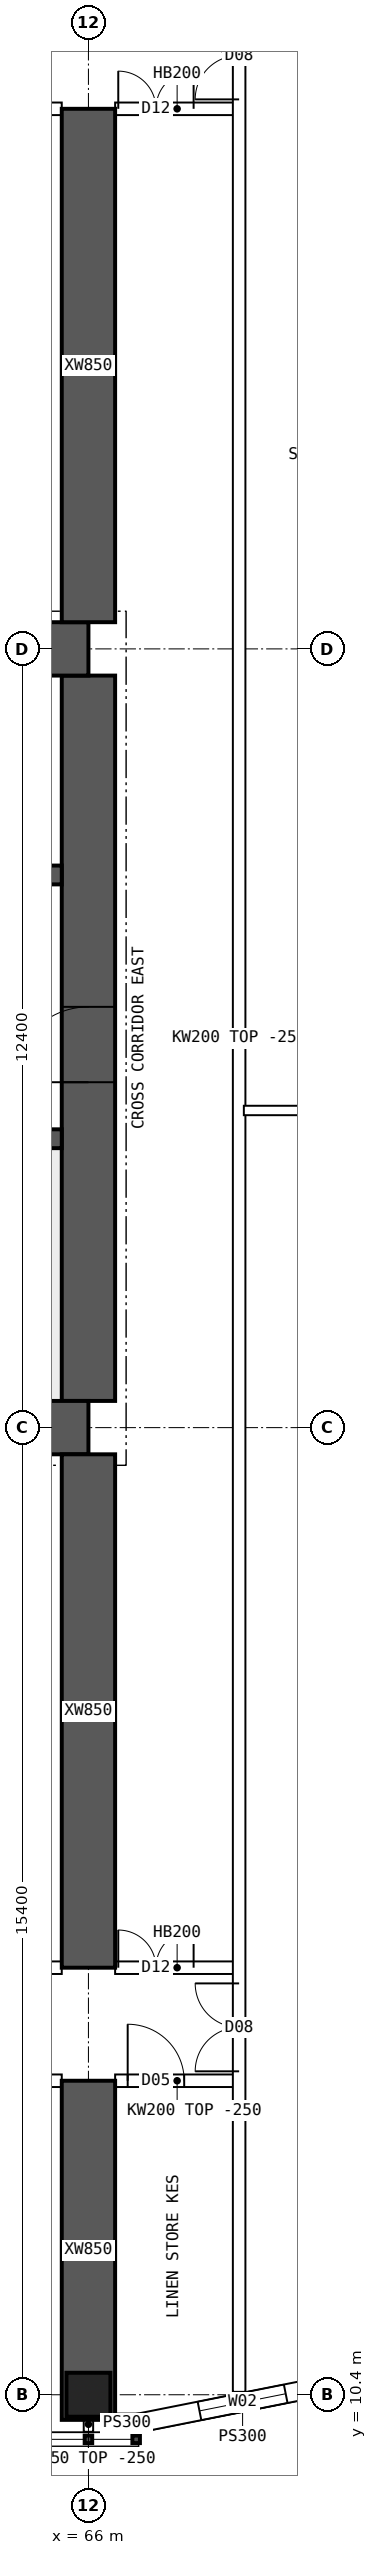
"""IFC4 building model, lengths in metres.
Left out: names, types, materials, properties, quantities, classifications, styles, units other than length and angle.
Written with IfcOpenShell. Run it as: python <this file> out.ifc"""

import sys

from ifc_helpers import new_model, si_unit, direction, frame, frame_2d, origin, origin_2d, place, context, subcontext, project, spatial, polyline, rectangle, hollow_rectangle, outline, extrude, element, fill, save


model = new_model("IFC4")
c1 = context("Model", 3, precision=1e-05, world=origin(), true_north=direction((0.0, 1.0)))
c2 = subcontext(c1, "Body", "Model", "MODEL_VIEW")
j1 = project(units=[si_unit("LENGTHUNIT", "METRE"), si_unit("PLANEANGLEUNIT", "RADIAN")], contexts=[c1])
p1 = place(None, origin())
s1 = spatial("IfcSite", under=j1, at=p1, CompositionType="ELEMENT")
p2 = place(p1, origin())
s2 = spatial("IfcBuilding", under=s1, at=p2, CompositionType="ELEMENT")
p3 = place(p2, frame((0.0, 0.0, 178.6)))
s3 = spatial("IfcBuildingStorey", under=s2, at=p3, CompositionType="ELEMENT", Elevation=178.6)
p4 = place(p3, frame((66.0, 10.4, 0.0), z_axis=(0.0, 0.0, 1.0), x_axis=(1.0, 0.0, 0.0)))
e1 = element("IfcColumn", 1, at=p4, inside=s3, PredefinedType="COLUMN", context=c2, shape_type="SweptSolid", body=[
    extrude(hollow_rectangle(XDim=0.7, YDim=0.7, WallThickness=0.07, at=origin_2d()), origin(), (0.0, 0.0, 1.0), 3.75),
])
for number, where, z_axis, x_axis in (
    (2, (18.0, 25.8, 0.0), (0.0, 0.0, 1.0), (1.0, 0.0, 0.0)),
    (3, (18.0, 38.2, 0.0), (0.0, 0.0, 1.0), (1.0, 0.0, 0.0)),
):
    element("IfcWall", number, at=place(p3, frame(where, z_axis=z_axis, x_axis=x_axis)), inside=s3, PredefinedType="SHEAR", context=c2, shape_type="SweptSolid", body=[
        extrude(rectangle(XDim=48.0, YDim=0.85, at=frame_2d((24.0, 0.0))), origin(), (0.0, 0.0, 1.0), 3.75),
    ])
p5 = place(p3, frame((66.0, 26.225, 0.0), z_axis=(0.0, 0.0, 1.0), x_axis=(0.0, 1.0, 0.0)))
e4 = element("IfcWall", 4, at=p5, inside=s3, PredefinedType="SHEAR", context=c2, shape_type="SweptSolid", body=[
    extrude(rectangle(XDim=11.55, YDim=0.85, at=frame_2d((5.775, 0.0))), origin(), (0.0, 0.0, 1.0), 3.75),
])
p6 = place(p5, frame((5.075, 0.0, 0.0)))
e5 = element("IfcOpeningElement", 5, at=p6, cuts=e4, PredefinedType="OPENING", context=c2, shape_type="SweptSolid", body=[
    extrude(rectangle(XDim=1.2, YDim=2.1, at=frame_2d((0.6, 1.05))), frame((0.0, 0.435, 0.0), z_axis=(0.0, -1.0, 0.0), x_axis=(1.0, 0.0, 0.0)), (0.0, 0.0, 1.0), 0.87),
])
p7 = place(p3, frame((18.425, 30.4, 0.0), z_axis=(0.0, 0.0, 1.0), x_axis=(1.0, 0.0, 0.0)))
e6 = element("IfcWall", 6, at=p7, inside=s3, PredefinedType="SHEAR", context=c2, shape_type="SweptSolid", body=[
    extrude(rectangle(XDim=47.15, YDim=0.3, at=frame_2d((23.575, 0.0))), origin(), (0.0, 0.0, 1.0), 3.75),
])
p8 = place(p7, frame((0.4, 0.0, 0.0)))
e7 = element("IfcOpeningElement", 7, at=p8, cuts=e6, PredefinedType="OPENING", context=c2, shape_type="SweptSolid", body=[
    extrude(rectangle(XDim=1.0, YDim=2.1, at=frame_2d((0.5, 1.05))), frame((0.0, 0.16, 0.0), z_axis=(0.0, -1.0, 0.0), x_axis=(1.0, 0.0, 0.0)), (0.0, 0.0, 1.0), 0.32),
])
p9 = place(p7, frame((45.75, 0.0, 0.0)))
e8 = element("IfcOpeningElement", 8, at=p9, cuts=e6, PredefinedType="OPENING", context=c2, shape_type="SweptSolid", body=[
    extrude(rectangle(XDim=1.0, YDim=2.1, at=frame_2d((0.5, 1.05))), frame((0.0, 0.16, 0.0), z_axis=(0.0, -1.0, 0.0), x_axis=(1.0, 0.0, 0.0)), (0.0, 0.0, 1.0), 0.32),
])
p10 = place(p7, frame((8.325, 0.0, 0.0)))
e9 = element("IfcOpeningElement", 9, at=p10, cuts=e6, PredefinedType="OPENING", context=c2, shape_type="SweptSolid", body=[
    extrude(rectangle(XDim=1.1, YDim=2.1, at=frame_2d((0.55, 1.05))), frame((0.0, 0.16, 0.0), z_axis=(0.0, -1.0, 0.0), x_axis=(1.0, 0.0, 0.0)), (0.0, 0.0, 1.0), 0.32),
])
p11 = place(p7, frame((10.925, 0.0, 0.0)))
e10 = element("IfcOpeningElement", 10, at=p11, cuts=e6, PredefinedType="OPENING", context=c2, shape_type="SweptSolid", body=[
    extrude(rectangle(XDim=1.1, YDim=2.1, at=frame_2d((0.55, 1.05))), frame((0.0, 0.16, 0.0), z_axis=(0.0, -1.0, 0.0), x_axis=(1.0, 0.0, 0.0)), (0.0, 0.0, 1.0), 0.32),
])
p12 = place(p7, frame((13.525, 0.0, 0.0)))
e11 = element("IfcOpeningElement", 11, at=p12, cuts=e6, PredefinedType="OPENING", context=c2, shape_type="SweptSolid", body=[
    extrude(rectangle(XDim=1.1, YDim=2.1, at=frame_2d((0.55, 1.05))), frame((0.0, 0.16, 0.0), z_axis=(0.0, -1.0, 0.0), x_axis=(1.0, 0.0, 0.0)), (0.0, 0.0, 1.0), 0.32),
])
p13 = place(p7, frame((16.125, 0.0, 0.0)))
e12 = element("IfcOpeningElement", 12, at=p13, cuts=e6, PredefinedType="OPENING", context=c2, shape_type="SweptSolid", body=[
    extrude(rectangle(XDim=1.1, YDim=2.1, at=frame_2d((0.55, 1.05))), frame((0.0, 0.16, 0.0), z_axis=(0.0, -1.0, 0.0), x_axis=(1.0, 0.0, 0.0)), (0.0, 0.0, 1.0), 0.32),
])
p14 = place(p7, frame((18.9, 0.0, 0.0)))
e13 = element("IfcOpeningElement", 13, at=p14, cuts=e6, PredefinedType="OPENING", context=c2, shape_type="SweptSolid", body=[
    extrude(rectangle(XDim=0.9, YDim=2.1, at=frame_2d((0.45, 1.05))), frame((0.0, 0.16, 0.0), z_axis=(0.0, -1.0, 0.0), x_axis=(1.0, 0.0, 0.0)), (0.0, 0.0, 1.0), 0.32),
])
p15 = place(p7, frame((30.192, 0.0, 0.0)))
e14 = element("IfcOpeningElement", 14, at=p15, cuts=e6, PredefinedType="OPENING", context=c2, shape_type="SweptSolid", body=[
    extrude(rectangle(XDim=1.1, YDim=2.1, at=frame_2d((0.55, 1.05))), frame((0.0, 0.16, 0.0), z_axis=(0.0, -1.0, 0.0), x_axis=(1.0, 0.0, 0.0)), (0.0, 0.0, 1.0), 0.32),
])
p16 = place(p7, frame((33.725, 0.0, 0.0)))
e15 = element("IfcOpeningElement", 15, at=p16, cuts=e6, PredefinedType="OPENING", context=c2, shape_type="SweptSolid", body=[
    extrude(rectangle(XDim=1.1, YDim=2.1, at=frame_2d((0.55, 1.05))), frame((0.0, 0.16, 0.0), z_axis=(0.0, -1.0, 0.0), x_axis=(1.0, 0.0, 0.0)), (0.0, 0.0, 1.0), 0.32),
])
p17 = place(p7, frame((37.258, 0.0, 0.0)))
e16 = element("IfcOpeningElement", 16, at=p17, cuts=e6, PredefinedType="OPENING", context=c2, shape_type="SweptSolid", body=[
    extrude(rectangle(XDim=1.1, YDim=2.1, at=frame_2d((0.55, 1.05))), frame((0.0, 0.16, 0.0), z_axis=(0.0, -1.0, 0.0), x_axis=(1.0, 0.0, 0.0)), (0.0, 0.0, 1.0), 0.32),
])
p18 = place(p3, frame((18.425, 34.6, 0.0), z_axis=(0.0, 0.0, 1.0), x_axis=(1.0, 0.0, 0.0)))
e17 = element("IfcWall", 17, at=p18, inside=s3, PredefinedType="SHEAR", context=c2, shape_type="SweptSolid", body=[
    extrude(rectangle(XDim=47.15, YDim=0.3, at=frame_2d((23.575, 0.0))), origin(), (0.0, 0.0, 1.0), 3.75),
])
p19 = place(p18, frame((0.9, 0.0, 0.0)))
e18 = element("IfcOpeningElement", 18, at=p19, cuts=e17, PredefinedType="OPENING", context=c2, shape_type="SweptSolid", body=[
    extrude(rectangle(XDim=1.1, YDim=2.1, at=frame_2d((0.55, 1.05))), frame((0.0, 0.16, 0.0), z_axis=(0.0, -1.0, 0.0), x_axis=(1.0, 0.0, 0.0)), (0.0, 0.0, 1.0), 0.32),
])
p20 = place(p18, frame((45.15, 0.0, 0.0)))
e19 = element("IfcOpeningElement", 19, at=p20, cuts=e17, PredefinedType="OPENING", context=c2, shape_type="SweptSolid", body=[
    extrude(rectangle(XDim=1.1, YDim=2.1, at=frame_2d((0.55, 1.05))), frame((0.0, 0.16, 0.0), z_axis=(0.0, -1.0, 0.0), x_axis=(1.0, 0.0, 0.0)), (0.0, 0.0, 1.0), 0.32),
])
p21 = place(p18, frame((4.175, 0.0, 0.0)))
e20 = element("IfcOpeningElement", 20, at=p21, cuts=e17, PredefinedType="OPENING", context=c2, shape_type="SweptSolid", body=[
    extrude(rectangle(XDim=0.9, YDim=2.1, at=frame_2d((0.45, 1.05))), frame((0.0, 0.16, 0.0), z_axis=(0.0, -1.0, 0.0), x_axis=(1.0, 0.0, 0.0)), (0.0, 0.0, 1.0), 0.32),
])
p22 = place(p18, frame((42.075, 0.0, 0.0)))
e21 = element("IfcOpeningElement", 21, at=p22, cuts=e17, PredefinedType="OPENING", context=c2, shape_type="SweptSolid", body=[
    extrude(rectangle(XDim=0.9, YDim=2.1, at=frame_2d((0.45, 1.05))), frame((0.0, 0.16, 0.0), z_axis=(0.0, -1.0, 0.0), x_axis=(1.0, 0.0, 0.0)), (0.0, 0.0, 1.0), 0.32),
])
p23 = place(p18, frame((8.95, 0.0, 0.0)))
e22 = element("IfcOpeningElement", 22, at=p23, cuts=e17, PredefinedType="OPENING", context=c2, shape_type="SweptSolid", body=[
    extrude(rectangle(XDim=0.9, YDim=2.1, at=frame_2d((0.45, 1.05))), frame((0.0, 0.16, 0.0), z_axis=(0.0, -1.0, 0.0), x_axis=(1.0, 0.0, 0.0)), (0.0, 0.0, 1.0), 0.32),
])
p24 = place(p18, frame((12.924, 0.0, 0.0)))
e23 = element("IfcOpeningElement", 23, at=p24, cuts=e17, PredefinedType="OPENING", context=c2, shape_type="SweptSolid", body=[
    extrude(rectangle(XDim=0.9, YDim=2.1, at=frame_2d((0.45, 1.05))), frame((0.0, 0.16, 0.0), z_axis=(0.0, -1.0, 0.0), x_axis=(1.0, 0.0, 0.0)), (0.0, 0.0, 1.0), 0.32),
])
p25 = place(p18, frame((16.571, 0.0, 0.0)))
e24 = element("IfcOpeningElement", 24, at=p25, cuts=e17, PredefinedType="OPENING", context=c2, shape_type="SweptSolid", body=[
    extrude(rectangle(XDim=0.9, YDim=2.1, at=frame_2d((0.45, 1.05))), frame((0.0, 0.16, 0.0), z_axis=(0.0, -1.0, 0.0), x_axis=(1.0, 0.0, 0.0)), (0.0, 0.0, 1.0), 0.32),
])
p26 = place(p18, frame((20.33, 0.0, 0.0)))
e25 = element("IfcOpeningElement", 25, at=p26, cuts=e17, PredefinedType="OPENING", context=c2, shape_type="SweptSolid", body=[
    extrude(rectangle(XDim=0.9, YDim=2.1, at=frame_2d((0.45, 1.05))), frame((0.0, 0.16, 0.0), z_axis=(0.0, -1.0, 0.0), x_axis=(1.0, 0.0, 0.0)), (0.0, 0.0, 1.0), 0.32),
])
p27 = place(p18, frame((24.736, 0.0, 0.0)))
e26 = element("IfcOpeningElement", 26, at=p27, cuts=e17, PredefinedType="OPENING", context=c2, shape_type="SweptSolid", body=[
    extrude(rectangle(XDim=0.9, YDim=2.1, at=frame_2d((0.45, 1.05))), frame((0.0, 0.16, 0.0), z_axis=(0.0, -1.0, 0.0), x_axis=(1.0, 0.0, 0.0)), (0.0, 0.0, 1.0), 0.32),
])
p28 = place(p18, frame((27.533, 0.0, 0.0)))
e27 = element("IfcOpeningElement", 27, at=p28, cuts=e17, PredefinedType="OPENING", context=c2, shape_type="SweptSolid", body=[
    extrude(rectangle(XDim=0.9, YDim=2.1, at=frame_2d((0.45, 1.05))), frame((0.0, 0.16, 0.0), z_axis=(0.0, -1.0, 0.0), x_axis=(1.0, 0.0, 0.0)), (0.0, 0.0, 1.0), 0.32),
])
p29 = place(p18, frame((33.654, 0.0, 0.0)))
e28 = element("IfcOpeningElement", 28, at=p29, cuts=e17, PredefinedType="OPENING", context=c2, shape_type="SweptSolid", body=[
    extrude(rectangle(XDim=0.9, YDim=2.1, at=frame_2d((0.45, 1.05))), frame((0.0, 0.16, 0.0), z_axis=(0.0, -1.0, 0.0), x_axis=(1.0, 0.0, 0.0)), (0.0, 0.0, 1.0), 0.32),
])
p30 = place(p3, frame((66.0, 10.0, 0.0), z_axis=(0.0, 0.0, 1.0), x_axis=(0.0, 1.0, 0.0)))
e29 = element("IfcWall", 29, at=p30, inside=s3, PredefinedType="SHEAR", context=c2, shape_type="SweptSolid", body=[
    extrude(rectangle(XDim=5.4, YDim=0.85, at=frame_2d((2.7, 0.0))), origin(), (0.0, 0.0, 1.0), 3.75),
])
for number, where, z_axis, x_axis in (
    (30, (66.0, 17.2, 0.0), (0.0, 0.0, 1.0), (0.0, 1.0, 0.0)),
    (31, (66.0, 38.625, 0.0), (0.0, 0.0, 1.0), (0.0, 1.0, 0.0)),
):
    element("IfcWall", number, at=place(p3, frame(where, z_axis=z_axis, x_axis=x_axis)), inside=s3, PredefinedType="SHEAR", context=c2, shape_type="SweptSolid", body=[
        extrude(rectangle(XDim=8.175, YDim=0.85, at=frame_2d((4.087, 0.0))), origin(), (0.0, 0.0, 1.0), 3.75),
    ])
p31 = place(p3, frame((66.8, 9.95, 0.0), z_axis=(0.0, 0.0, 1.0), x_axis=(0.98078325777, 0.195100490205, 0.0)))
e32 = element("IfcWall", 32, at=p31, inside=s3, PredefinedType="SOLIDWALL", context=c2, shape_type="SweptSolid", body=[
    extrude(outline(polyline([(-0.03, -0.15), (3.405, -0.15), (3.345, 0.15), (0.03, 0.15), (-0.03, -0.15)])), origin(), (0.0, 0.0, 1.0), 3.5),
])
p32 = place(p31, frame((0.988, 0.0, 0.9)))
e33 = element("IfcOpeningElement", 33, at=p32, cuts=e32, PredefinedType="OPENING", context=c2, shape_type="SweptSolid", body=[
    extrude(rectangle(XDim=1.4, YDim=1.8, at=frame_2d((0.7, 0.9))), frame((0.0, 0.16, 0.0), z_axis=(0.0, -1.0, 0.0), x_axis=(1.0, 0.0, 0.0)), (0.0, 0.0, 1.0), 0.32),
])
p33 = place(p3, frame((66.8, 9.95, 0.0), z_axis=(0.0, 0.0, 1.0), x_axis=(-1.0, 0.0, 0.0)))
e34 = element("IfcWall", 34, at=p33, inside=s3, PredefinedType="SOLIDWALL", context=c2, shape_type="SweptSolid", body=[
    extrude(rectangle(XDim=0.375, YDim=0.3, at=frame_2d((0.188, 0.0))), origin(), (0.0, 0.0, 1.0), 3.5),
])
p34 = place(p3, frame((60.425, 15.4, 0.0), z_axis=(0.0, 0.0, 1.0), x_axis=(1.0, 0.0, 0.0)))
e35 = element("IfcWall", 35, at=p34, inside=s3, PredefinedType="SOLIDWALL", context=c2, shape_type="SweptSolid", body=[
    extrude(outline(polyline([(0.0, 0.0), (5.15, 0.0), (5.15, 3.1), (0.0, 3.1), (0.0, 0.0)])), frame((0.0, 0.1, 0.0), z_axis=(0.0, -1.0, 0.0), x_axis=(1.0, 0.0, 0.0)), (0.0, 0.0, 1.0), 0.2),
])
p35 = place(p34, frame((0.1, 0.0, 0.0)))
e36 = element("IfcOpeningElement", 36, at=p35, cuts=e35, PredefinedType="OPENING", context=c2, shape_type="SweptSolid", body=[
    extrude(rectangle(XDim=0.9, YDim=2.1, at=frame_2d((0.45, 1.05))), frame((0.0, 0.11, 0.0), z_axis=(0.0, -1.0, 0.0), x_axis=(1.0, 0.0, 0.0)), (0.0, 0.0, 1.0), 0.22),
])
p36 = place(p34, frame((3.95, 0.0, 0.0)))
e37 = element("IfcOpeningElement", 37, at=p36, cuts=e35, PredefinedType="OPENING", context=c2, shape_type="SweptSolid", body=[
    extrude(rectangle(XDim=0.9, YDim=2.1, at=frame_2d((0.45, 1.05))), frame((0.0, 0.11, 0.0), z_axis=(0.0, -1.0, 0.0), x_axis=(1.0, 0.0, 0.0)), (0.0, 0.0, 1.0), 0.22),
])
p37 = place(p3, frame((60.425, 17.2, 0.0), z_axis=(0.0, 0.0, 1.0), x_axis=(1.0, 0.0, 0.0)))
e38 = element("IfcWall", 38, at=p37, inside=s3, PredefinedType="SOLIDWALL", context=c2, shape_type="SweptSolid", body=[
    extrude(rectangle(XDim=5.15, YDim=0.2, at=frame_2d((2.575, 0.0))), origin(), (0.0, 0.0, 1.0), 3.5),
])
p38 = place(p37, frame((0.15, 0.0, 0.0)))
e39 = element("IfcOpeningElement", 39, at=p38, cuts=e38, PredefinedType="OPENING", context=c2, shape_type="SweptSolid", body=[
    extrude(rectangle(XDim=0.9, YDim=2.1, at=frame_2d((0.45, 1.05))), frame((0.0, 0.11, 0.0), z_axis=(0.0, -1.0, 0.0), x_axis=(1.0, 0.0, 0.0)), (0.0, 0.0, 1.0), 0.22),
])
p39 = place(p37, frame((3.655, 0.0, 0.0)))
e40 = element("IfcOpeningElement", 40, at=p39, cuts=e38, PredefinedType="OPENING", context=c2, shape_type="SweptSolid", body=[
    extrude(rectangle(XDim=0.9, YDim=2.1, at=frame_2d((0.45, 1.05))), frame((0.0, 0.11, 0.0), z_axis=(0.0, -1.0, 0.0), x_axis=(1.0, 0.0, 0.0)), (0.0, 0.0, 1.0), 0.22),
])
p40 = place(p3, frame((66.425, 15.4, 0.0), z_axis=(0.0, 0.0, 1.0), x_axis=(1.0, 0.0, 0.0)))
e41 = element("IfcWall", 41, at=p40, inside=s3, PredefinedType="SOLIDWALL", context=c2, shape_type="SweptSolid", body=[
    extrude(rectangle(XDim=1.975, YDim=0.2, at=frame_2d((0.987, 0.0))), origin(), (0.0, 0.0, 1.0), 3.5),
])
p41 = place(p40, frame((0.2, 0.0, 0.0)))
e42 = element("IfcOpeningElement", 42, at=p41, cuts=e41, PredefinedType="OPENING", context=c2, shape_type="SweptSolid", body=[
    extrude(rectangle(XDim=0.9, YDim=2.1, at=frame_2d((0.45, 1.05))), frame((0.0, 0.11, 0.0), z_axis=(0.0, -1.0, 0.0), x_axis=(1.0, 0.0, 0.0)), (0.0, 0.0, 1.0), 0.22),
])
p42 = place(p3, frame((66.425, 17.2, 0.0), z_axis=(0.0, 0.0, 1.0), x_axis=(1.0, 0.0, 0.0)))
e43 = element("IfcWall", 43, at=p42, inside=s3, PredefinedType="SOLIDWALL", context=c2, shape_type="SweptSolid", body=[
    extrude(rectangle(XDim=1.975, YDim=0.2, at=frame_2d((0.987, 0.0))), origin(), (0.0, 0.0, 1.0), 3.5),
])
p43 = place(p42, frame((0.05, 0.0, 0.0)))
e44 = element("IfcOpeningElement", 44, at=p43, cuts=e43, PredefinedType="OPENING", context=c2, shape_type="SweptSolid", body=[
    extrude(rectangle(XDim=1.2, YDim=2.1, at=frame_2d((0.6, 1.05))), frame((0.0, 0.11, 0.0), z_axis=(0.0, -1.0, 0.0), x_axis=(1.0, 0.0, 0.0)), (0.0, 0.0, 1.0), 0.22),
])
p44 = place(p3, frame((60.425, 46.8, 0.0), z_axis=(0.0, 0.0, 1.0), x_axis=(1.0, 0.0, 0.0)))
e45 = element("IfcWall", 45, at=p44, inside=s3, PredefinedType="SOLIDWALL", context=c2, shape_type="SweptSolid", body=[
    extrude(rectangle(XDim=5.15, YDim=0.2, at=frame_2d((2.575, 0.0))), origin(), (0.0, 0.0, 1.0), 3.5),
])
p45 = place(p44, frame((0.15, 0.0, 0.0)))
e46 = element("IfcOpeningElement", 46, at=p45, cuts=e45, PredefinedType="OPENING", context=c2, shape_type="SweptSolid", body=[
    extrude(rectangle(XDim=0.9, YDim=2.1, at=frame_2d((0.45, 1.05))), frame((0.0, 0.11, 0.0), z_axis=(0.0, -1.0, 0.0), x_axis=(1.0, 0.0, 0.0)), (0.0, 0.0, 1.0), 0.22),
])
p46 = place(p44, frame((3.655, 0.0, 0.0)))
e47 = element("IfcOpeningElement", 47, at=p46, cuts=e45, PredefinedType="OPENING", context=c2, shape_type="SweptSolid", body=[
    extrude(rectangle(XDim=0.9, YDim=2.1, at=frame_2d((0.45, 1.05))), frame((0.0, 0.11, 0.0), z_axis=(0.0, -1.0, 0.0), x_axis=(1.0, 0.0, 0.0)), (0.0, 0.0, 1.0), 0.22),
])
p47 = place(p3, frame((66.425, 46.8, 0.0), z_axis=(0.0, 0.0, 1.0), x_axis=(1.0, 0.0, 0.0)))
e48 = element("IfcWall", 48, at=p47, inside=s3, PredefinedType="SOLIDWALL", context=c2, shape_type="SweptSolid", body=[
    extrude(rectangle(XDim=1.975, YDim=0.2, at=frame_2d((0.987, 0.0))), origin(), (0.0, 0.0, 1.0), 3.5),
])
p48 = place(p47, frame((0.05, 0.0, 0.0)))
e49 = element("IfcOpeningElement", 49, at=p48, cuts=e48, PredefinedType="OPENING", context=c2, shape_type="SweptSolid", body=[
    extrude(rectangle(XDim=1.2, YDim=2.1, at=frame_2d((0.6, 1.05))), frame((0.0, 0.11, 0.0), z_axis=(0.0, -1.0, 0.0), x_axis=(1.0, 0.0, 0.0)), (0.0, 0.0, 1.0), 0.22),
])
p49 = place(p3, frame((68.475, 30.85, 0.0), z_axis=(0.0, 0.0, 1.0), x_axis=(1.0, 0.0, 0.0)))
e50 = element("IfcWall", 50, at=p49, inside=s3, PredefinedType="PARTITIONING", context=c2, shape_type="SweptSolid", body=[
    extrude(outline(polyline([(0.0, 0.0), (6.82, 0.0), (6.82, 3.5), (3.827, 3.5), (3.825, 3.05), (3.227, 3.05), (3.225, 3.5), (0.0, 3.5), (0.0, 0.0)])), frame((0.0, 0.075, 0.0), z_axis=(0.0, -1.0, 0.0), x_axis=(1.0, 0.0, 0.0)), (0.0, 0.0, 1.0), 0.15),
])
p50 = place(p3, frame((68.4, 10.446, 0.0), z_axis=(0.0, 0.0, 1.0), x_axis=(0.0, 1.0, 0.0)))
e51 = element("IfcWall", 51, at=p50, inside=s3, PredefinedType="SOLIDWALL", context=c2, shape_type="SweptSolid", body=[
    extrude(rectangle(XDim=43.107, YDim=0.2, at=frame_2d((21.554, 0.0))), origin(), (0.0, 0.0, 1.0), 3.5),
])
p51 = place(p50, frame((5.104, 0.0, 0.0)))
e52 = element("IfcOpeningElement", 52, at=p51, cuts=e51, PredefinedType="OPENING", context=c2, shape_type="SweptSolid", body=[
    extrude(rectangle(XDim=1.4, YDim=2.1, at=frame_2d((0.7, 1.05))), frame((0.0, 0.11, 0.0), z_axis=(0.0, -1.0, 0.0), x_axis=(1.0, 0.0, 0.0)), (0.0, 0.0, 1.0), 0.22),
])
p52 = place(p50, frame((36.504, 0.0, 0.0)))
e53 = element("IfcOpeningElement", 53, at=p52, cuts=e51, PredefinedType="OPENING", context=c2, shape_type="SweptSolid", body=[
    extrude(rectangle(XDim=1.4, YDim=2.1, at=frame_2d((0.7, 1.05))), frame((0.0, 0.11, 0.0), z_axis=(0.0, -1.0, 0.0), x_axis=(1.0, 0.0, 0.0)), (0.0, 0.0, 1.0), 0.22),
])
p53 = place(p3, frame((66.0, 10.05, 0.0), z_axis=(0.0, 0.0, 1.0), x_axis=(0.0, -1.0, 0.0)))
e54 = element("IfcWall", 54, at=p53, inside=s3, PredefinedType="PARTITIONING", context=c2, shape_type="SweptSolid", body=[
    extrude(rectangle(XDim=0.24, YDim=0.15, at=frame_2d((0.12, 0.0))), origin(), (0.0, 0.0, 1.0), 3.5),
])
p54 = place(p32, origin())
e55 = element("IfcWindow", 55, at=p54, inside=s3, PartitioningType="SINGLE_PANEL", PredefinedType="WINDOW", context=c2, shape_type="SweptSolid", body=[
    extrude(rectangle(XDim=1.4, YDim=1.8, at=frame_2d((0.7, 0.9))), frame((0.0, 0.03, 0.0), z_axis=(0.0, -1.0, 0.0), x_axis=(1.0, 0.0, 0.0)), (0.0, 0.0, 1.0), 0.06),
])
fill(e33, e55)
p55 = place(p6, origin())
e56 = element("IfcDoor", 56, at=p55, inside=s3, OperationType="SINGLE_SWING_LEFT", PredefinedType="DOOR", context=c2, shape_type="SweptSolid", body=[
    extrude(rectangle(XDim=1.2, YDim=2.1, at=frame_2d((0.6, 1.05))), frame((0.0, 0.025, 0.0), z_axis=(0.0, -1.0, 0.0), x_axis=(1.0, 0.0, 0.0)), (0.0, 0.0, 1.0), 0.05),
])
fill(e5, e56)
p56 = place(p43, origin())
e57 = element("IfcDoor", 57, at=p56, inside=s3, OperationType="DOUBLE_DOOR_SINGLE_SWING", PredefinedType="DOOR", context=c2, shape_type="SweptSolid", body=[
    extrude(rectangle(XDim=1.2, YDim=2.1, at=frame_2d((0.6, 1.05))), frame((0.0, 0.025, 0.0), z_axis=(0.0, -1.0, 0.0), x_axis=(1.0, 0.0, 0.0)), (0.0, 0.0, 1.0), 0.05),
])
fill(e44, e57)
p57 = place(p48, origin())
e58 = element("IfcDoor", 58, at=p57, inside=s3, OperationType="DOUBLE_DOOR_SINGLE_SWING", PredefinedType="DOOR", context=c2, shape_type="SweptSolid", body=[
    extrude(rectangle(XDim=1.2, YDim=2.1, at=frame_2d((0.6, 1.05))), frame((0.0, 0.025, 0.0), z_axis=(0.0, -1.0, 0.0), x_axis=(1.0, 0.0, 0.0)), (0.0, 0.0, 1.0), 0.05),
])
fill(e49, e58)
p58 = place(p51, origin())
e59 = element("IfcDoor", 59, at=p58, inside=s3, OperationType="DOUBLE_DOOR_SINGLE_SWING", PredefinedType="DOOR", context=c2, shape_type="SweptSolid", body=[
    extrude(rectangle(XDim=1.4, YDim=2.1, at=frame_2d((0.7, 1.05))), frame((0.0, 0.025, 0.0), z_axis=(0.0, -1.0, 0.0), x_axis=(1.0, 0.0, 0.0)), (0.0, 0.0, 1.0), 0.05),
])
fill(e52, e59)
p59 = place(p52, origin())
e60 = element("IfcDoor", 60, at=p59, inside=s3, OperationType="DOUBLE_DOOR_SINGLE_SWING", PredefinedType="DOOR", context=c2, shape_type="SweptSolid", body=[
    extrude(rectangle(XDim=1.4, YDim=2.1, at=frame_2d((0.7, 1.05))), frame((0.0, 0.025, 0.0), z_axis=(0.0, -1.0, 0.0), x_axis=(1.0, 0.0, 0.0)), (0.0, 0.0, 1.0), 0.05),
])
fill(e53, e60)
p60 = place(p41, origin())
e61 = element("IfcDoor", 61, at=p60, inside=s3, OperationType="SINGLE_SWING_LEFT", PredefinedType="DOOR", context=c2, shape_type="SweptSolid", body=[
    extrude(rectangle(XDim=0.9, YDim=2.1, at=frame_2d((0.45, 1.05))), frame((0.0, 0.025, 0.0), z_axis=(0.0, -1.0, 0.0), x_axis=(1.0, 0.0, 0.0)), (0.0, 0.0, 1.0), 0.05),
])
fill(e42, e61)
save(model, sys.argv[1])
